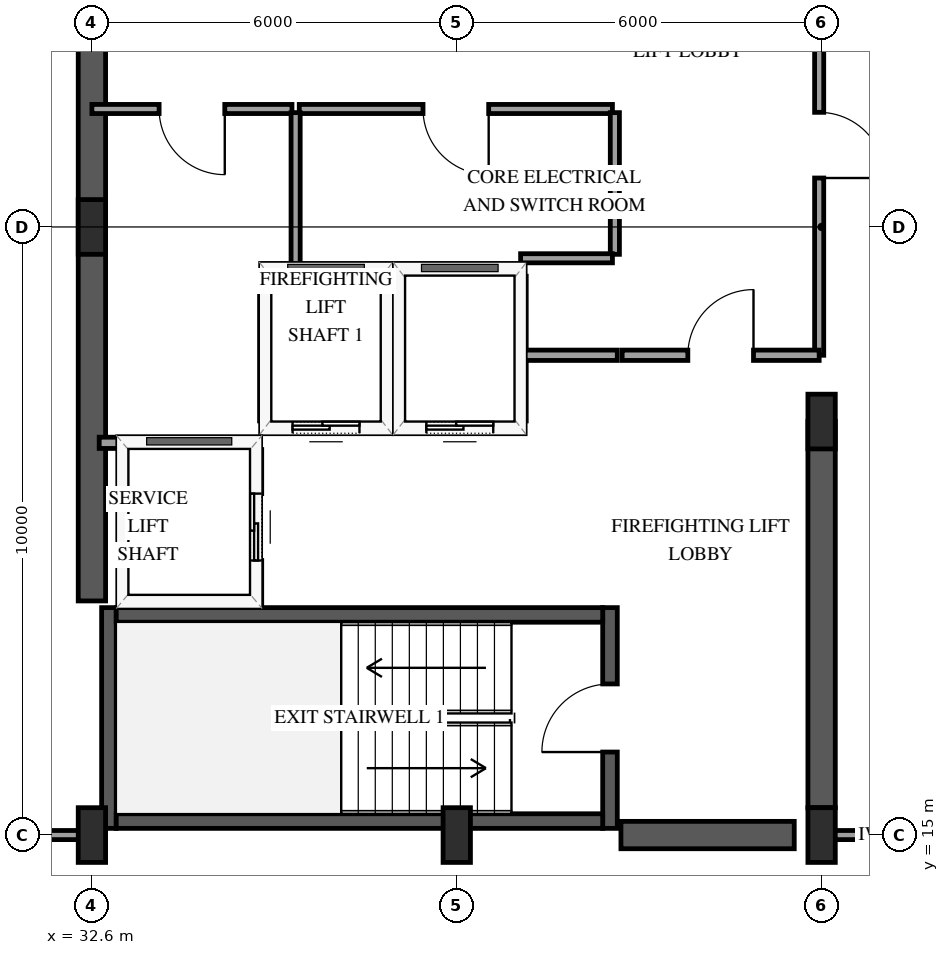
"""IFC4 building model, lengths in metres.
Left out: names, types, materials, properties, quantities, classifications, styles, units other than length and angle.
Written with IfcOpenShell. Run it as: python <this file> out.ifc"""

import sys

from ifc_helpers import new_model, si_unit, direction, frame, frame_2d, origin, origin_2d, place, context, subcontext, project, spatial, rectangle, extrude, element, fill, save


model = new_model("IFC4")
c1 = context("Model", 3, precision=1e-05, world=origin(), true_north=direction((0.0, 1.0)))
c2 = subcontext(c1, "Body", "Model", "MODEL_VIEW")
j1 = project(units=[si_unit("LENGTHUNIT", "METRE"), si_unit("PLANEANGLEUNIT", "RADIAN")], contexts=[c1])
p1 = place(None, origin())
s1 = spatial("IfcSite", under=j1, at=p1, CompositionType="ELEMENT")
p2 = place(p1, origin())
s2 = spatial("IfcBuilding", under=s1, at=p2, CompositionType="ELEMENT")
p3 = place(p2, frame((0.0, 0.0, 272.5)))
s3 = spatial("IfcBuildingStorey", under=s2, at=p3, CompositionType="ELEMENT", Elevation=272.5)
p4 = place(p3, frame((32.88, 15.11, 0.0), z_axis=(0.0, 0.0, 1.0), x_axis=(0.0, 1.0, 0.0)))
e1 = element("IfcWall", 1, at=p4, inside=s3, PredefinedType="SHEAR", context=c2, shape_type="SweptSolid", body=[
    extrude(rectangle(XDim=3.63, YDim=0.24, at=frame_2d((1.815, 0.0))), origin(), (0.0, 0.0, 1.0), 3.75),
])
p5 = place(p3, frame((41.12, 15.11, 0.0), z_axis=(0.0, 0.0, 1.0), x_axis=(0.0, 1.0, 0.0)))
e2 = element("IfcWall", 2, at=p5, inside=s3, PredefinedType="SHEAR", context=c2, shape_type="SweptSolid", body=[
    extrude(rectangle(XDim=3.63, YDim=0.24, at=frame_2d((1.815, 0.0))), origin(), (0.0, 0.0, 1.0), 3.75),
])
p6 = place(p5, frame((1.255, 0.0, 0.0)))
e3 = element("IfcOpeningElement", 3, at=p6, cuts=e2, PredefinedType="OPENING", context=c2, shape_type="SweptSolid", body=[
    extrude(rectangle(XDim=1.12, YDim=2.15, at=frame_2d((0.56, 1.075))), frame((0.0, 0.13, 0.0), z_axis=(0.0, -1.0, 0.0), x_axis=(1.0, 0.0, 0.0)), (0.0, 0.0, 1.0), 0.26),
])
for number, where, z_axis, x_axis in (
    (4, (33.0, 15.23, 0.0), (0.0, 0.0, 1.0), (1.0, 0.0, 0.0)),
    (5, (33.0, 18.62, 0.0), (0.0, 0.0, 1.0), (1.0, 0.0, 0.0)),
):
    element("IfcWall", number, at=place(p3, frame(where, z_axis=z_axis, x_axis=x_axis)), inside=s3, PredefinedType="SHEAR", context=c2, shape_type="SweptSolid", body=[
        extrude(rectangle(XDim=8.0, YDim=0.24, at=frame_2d((4.0, 0.0))), origin(), (0.0, 0.0, 1.0), 3.75),
    ])
p7 = place(p3, frame((32.6, 18.85, 0.0), z_axis=(0.0, 0.0, 1.0), x_axis=(0.0, 1.0, 0.0)))
e6 = element("IfcWall", 6, at=p7, inside=s3, PredefinedType="SHEAR", context=c2, shape_type="SweptSolid", body=[
    extrude(rectangle(XDim=12.3, YDim=0.45, at=frame_2d((6.15, 0.0))), origin(), (0.0, 0.0, 1.0), 3.75),
])
p8 = place(p3, frame((41.3, 15.0, 0.0), z_axis=(0.0, 0.0, 1.0), x_axis=(1.0, 0.0, 0.0)))
e7 = element("IfcWall", 7, at=p8, inside=s3, PredefinedType="SHEAR", context=c2, shape_type="SweptSolid", body=[
    extrude(rectangle(XDim=2.85, YDim=0.45, at=frame_2d((1.425, 0.0))), origin(), (0.0, 0.0, 1.0), 3.75),
])
p9 = place(p3, frame((44.6, 15.45, 0.0), z_axis=(0.0, 0.0, 1.0), x_axis=(0.0, 1.0, 0.0)))
e8 = element("IfcWall", 8, at=p9, inside=s3, PredefinedType="SHEAR", context=c2, shape_type="SweptSolid", body=[
    extrude(rectangle(XDim=6.35, YDim=0.45, at=frame_2d((3.175, 0.0))), origin(), (0.0, 0.0, 1.0), 3.75),
])
for number, where, z_axis, x_axis in (
    (9, (32.6, 15.0, 0.0), (0.0, 0.0, 1.0), (1.0, 0.0, 0.0)),
    (10, (32.6, 25.0, 0.0), (0.0, 0.0, 1.0), (1.0, 0.0, 0.0)),
    (11, (38.6, 15.0, 0.0), (0.0, 0.0, 1.0), (1.0, 0.0, 0.0)),
    (12, (44.6, 15.0, 0.0), (0.0, 0.0, 1.0), (1.0, 0.0, 0.0)),
    (13, (44.6, 21.8, 0.0), (0.0, 0.0, 1.0), (1.0, 0.0, 0.0)),
):
    element("IfcColumn", number, at=place(p3, frame(where, z_axis=z_axis, x_axis=x_axis)), inside=s3, PredefinedType="PILASTER", context=c2, shape_type="SweptSolid", body=[
        extrude(rectangle(XDim=0.45, YDim=0.9, at=origin_2d()), origin(), (0.0, 0.0, 1.0), 3.75),
    ])
p10 = place(p3, frame((35.45, 21.7, 0.0), z_axis=(0.0, 0.0, 1.0), x_axis=(1.0, 0.0, 0.0)))
e14 = element("IfcWall", 14, at=p10, inside=s3, PredefinedType="SOLIDWALL", context=c2, shape_type="SweptSolid", body=[
    extrude(rectangle(XDim=2.0, YDim=0.185, at=frame_2d((1.0, 0.0))), origin(), (0.0, 0.0, 1.0), 3.45),
])
p11 = place(p10, frame((0.45, 0.0, 0.0)))
e15 = element("IfcOpeningElement", 15, at=p11, cuts=e14, PredefinedType="OPENING", context=c2, shape_type="SweptSolid", body=[
    extrude(rectangle(XDim=1.1, YDim=2.15, at=frame_2d((0.55, 1.075))), frame((0.0, 0.103, 0.0), z_axis=(0.0, -1.0, 0.0), x_axis=(1.0, 0.0, 0.0)), (0.0, 0.0, 1.0), 0.205),
])
p12 = place(p3, frame((35.45, 24.3, 0.0), z_axis=(0.0, 0.0, 1.0), x_axis=(1.0, 0.0, 0.0)))
e16 = element("IfcWall", 16, at=p12, inside=s3, PredefinedType="SOLIDWALL", context=c2, shape_type="SweptSolid", body=[
    extrude(rectangle(XDim=2.0, YDim=0.185, at=frame_2d((1.0, 0.0))), origin(), (0.0, 0.0, 1.0), 3.45),
])
for number, where, z_axis, x_axis in (
    (17, (35.45, 21.81, 0.0), (0.0, 0.0, 1.0), (0.0, 1.0, 0.0)),
    (18, (37.45, 21.81, 0.0), (0.0, 0.0, 1.0), (0.0, 1.0, 0.0)),
):
    element("IfcWall", number, at=place(p3, frame(where, z_axis=z_axis, x_axis=x_axis)), inside=s3, PredefinedType="SOLIDWALL", context=c2, shape_type="SweptSolid", body=[
        extrude(rectangle(XDim=2.38, YDim=0.185, at=frame_2d((1.19, 0.0))), origin(), (0.0, 0.0, 1.0), 3.45),
    ])
p13 = place(p3, frame((37.65, 21.7, 0.0), z_axis=(0.0, 0.0, 1.0), x_axis=(1.0, 0.0, 0.0)))
e19 = element("IfcWall", 19, at=p13, inside=s3, PredefinedType="SOLIDWALL", context=c2, shape_type="SweptSolid", body=[
    extrude(rectangle(XDim=2.0, YDim=0.185, at=frame_2d((1.0, 0.0))), origin(), (0.0, 0.0, 1.0), 3.45),
])
p14 = place(p13, frame((0.45, 0.0, 0.0)))
e20 = element("IfcOpeningElement", 20, at=p14, cuts=e19, PredefinedType="OPENING", context=c2, shape_type="SweptSolid", body=[
    extrude(rectangle(XDim=1.1, YDim=2.15, at=frame_2d((0.55, 1.075))), frame((0.0, 0.103, 0.0), z_axis=(0.0, -1.0, 0.0), x_axis=(1.0, 0.0, 0.0)), (0.0, 0.0, 1.0), 0.205),
])
p15 = place(p3, frame((37.65, 24.3, 0.0), z_axis=(0.0, 0.0, 1.0), x_axis=(1.0, 0.0, 0.0)))
e21 = element("IfcWall", 21, at=p15, inside=s3, PredefinedType="SOLIDWALL", context=c2, shape_type="SweptSolid", body=[
    extrude(rectangle(XDim=2.0, YDim=0.185, at=frame_2d((1.0, 0.0))), origin(), (0.0, 0.0, 1.0), 3.45),
])
p16 = place(p3, frame((39.65, 21.81, 0.0), z_axis=(0.0, 0.0, 1.0), x_axis=(0.0, 1.0, 0.0)))
e22 = element("IfcWall", 22, at=p16, inside=s3, PredefinedType="SOLIDWALL", context=c2, shape_type="SweptSolid", body=[
    extrude(rectangle(XDim=2.38, YDim=0.185, at=frame_2d((1.19, 0.0))), origin(), (0.0, 0.0, 1.0), 3.45),
])
p17 = place(p3, frame((32.72, 21.45, 0.0), z_axis=(0.0, 0.0, 1.0), x_axis=(1.0, 0.0, 0.0)))
e23 = element("IfcWall", 23, at=p17, inside=s3, PredefinedType="SOLIDWALL", context=c2, shape_type="SweptSolid", body=[
    extrude(rectangle(XDim=2.58, YDim=0.185, at=frame_2d((1.29, 0.0))), origin(), (0.0, 0.0, 1.0), 3.45),
])
p18 = place(p3, frame((35.3, 18.79, 0.0), z_axis=(0.0, 0.0, 1.0), x_axis=(0.0, 1.0, 0.0)))
e24 = element("IfcWall", 24, at=p18, inside=s3, PredefinedType="SOLIDWALL", context=c2, shape_type="SweptSolid", body=[
    extrude(rectangle(XDim=2.55, YDim=0.185, at=frame_2d((1.275, 0.0))), origin(), (0.0, 0.0, 1.0), 3.45),
])
p19 = place(p18, frame((0.725, 0.0, 0.0)))
e25 = element("IfcOpeningElement", 25, at=p19, cuts=e24, PredefinedType="OPENING", context=c2, shape_type="SweptSolid", body=[
    extrude(rectangle(XDim=1.1, YDim=2.15, at=frame_2d((0.55, 1.075))), frame((0.0, 0.103, 0.0), z_axis=(0.0, -1.0, 0.0), x_axis=(1.0, 0.0, 0.0)), (0.0, 0.0, 1.0), 0.205),
])
p20 = place(p3, frame((44.56, 29.8, 0.0), z_axis=(0.0, 0.0, 1.0), x_axis=(0.0, -1.0, 0.0)))
e26 = element("IfcWall", 26, at=p20, inside=s3, PredefinedType="PARTITIONING", context=c2, shape_type="SweptSolid", body=[
    extrude(rectangle(XDim=6.91, YDim=0.15, at=frame_2d((3.455, 0.0))), origin(), (0.0, 0.0, 1.0), 2.49),
])
p21 = place(p20, frame((2.915, 0.0, 0.0)))
e27 = element("IfcOpeningElement", 27, at=p21, cuts=e26, PredefinedType="OPENING", context=c2, shape_type="SweptSolid", body=[
    extrude(rectangle(XDim=1.08, YDim=2.15, at=frame_2d((0.54, 1.075))), frame((0.0, 0.085, 0.0), z_axis=(0.0, -1.0, 0.0), x_axis=(1.0, 0.0, 0.0)), (0.0, 0.0, 1.0), 0.17),
])
p22 = place(p3, frame((41.16, 26.94, 0.0), z_axis=(0.0, 0.0, 1.0), x_axis=(-1.0, 0.0, 0.0)))
e28 = element("IfcWall", 28, at=p22, inside=s3, PredefinedType="PARTITIONING", context=c2, shape_type="SweptSolid", body=[
    extrude(rectangle(XDim=5.15, YDim=0.15, at=frame_2d((2.575, 0.0))), origin(), (0.0, 0.0, 1.0), 3.45),
])
p23 = place(p22, frame((2.035, 0.0, 0.0)))
e29 = element("IfcOpeningElement", 29, at=p23, cuts=e28, PredefinedType="OPENING", context=c2, shape_type="SweptSolid", body=[
    extrude(rectangle(XDim=1.08, YDim=2.15, at=frame_2d((0.54, 1.075))), frame((0.0, 0.085, 0.0), z_axis=(0.0, -1.0, 0.0), x_axis=(1.0, 0.0, 0.0)), (0.0, 0.0, 1.0), 0.17),
])
p24 = place(p3, frame((35.89, 26.94, 0.0), z_axis=(0.0, 0.0, 1.0), x_axis=(-1.0, 0.0, 0.0)))
e30 = element("IfcWall", 30, at=p24, inside=s3, PredefinedType="PARTITIONING", context=c2, shape_type="SweptSolid", body=[
    extrude(rectangle(XDim=3.29, YDim=0.15, at=frame_2d((1.645, 0.0))), origin(), (0.0, 0.0, 1.0), 3.45),
])
p25 = place(p24, frame((1.105, 0.0, 0.0)))
e31 = element("IfcOpeningElement", 31, at=p25, cuts=e30, PredefinedType="OPENING", context=c2, shape_type="SweptSolid", body=[
    extrude(rectangle(XDim=1.08, YDim=2.15, at=frame_2d((0.54, 1.075))), frame((0.0, 0.085, 0.0), z_axis=(0.0, -1.0, 0.0), x_axis=(1.0, 0.0, 0.0)), (0.0, 0.0, 1.0), 0.17),
])
p26 = place(p3, frame((41.32, 22.89, 0.0), z_axis=(0.0, 0.0, 1.0), x_axis=(1.0, 0.0, 0.0)))
e32 = element("IfcWall", 32, at=p26, inside=s3, PredefinedType="PARTITIONING", context=c2, shape_type="SweptSolid", body=[
    extrude(rectangle(XDim=3.24, YDim=0.17, at=frame_2d((1.62, 0.0))), origin(), (0.0, 0.0, 1.0), 3.45),
])
p27 = place(p26, frame((1.08, 0.0, 0.0)))
e33 = element("IfcOpeningElement", 33, at=p27, cuts=e32, PredefinedType="OPENING", context=c2, shape_type="SweptSolid", body=[
    extrude(rectangle(XDim=1.08, YDim=2.15, at=frame_2d((0.54, 1.075))), frame((0.0, 0.095, 0.0), z_axis=(0.0, -1.0, 0.0), x_axis=(1.0, 0.0, 0.0)), (0.0, 0.0, 1.0), 0.19),
])
p28 = place(p3, frame((32.53, 15.0, 0.0), z_axis=(0.0, 0.0, 1.0), x_axis=(-1.0, 0.0, 0.0)))
e34 = element("IfcWall", 34, at=p28, inside=s3, PredefinedType="PARTITIONING", context=c2, shape_type="SweptSolid", body=[
    extrude(rectangle(XDim=2.982, YDim=0.15, at=frame_2d((1.491, 0.0))), origin(), (0.0, 0.0, 1.0), 3.45),
])
p29 = place(p3, frame((35.95, 26.88, 0.0), z_axis=(0.0, 0.0, 1.0), x_axis=(0.0, -1.0, 0.0)))
e35 = element("IfcWall", 35, at=p29, inside=s3, PredefinedType="PARTITIONING", context=c2, shape_type="SweptSolid", body=[
    extrude(rectangle(XDim=2.58, YDim=0.15, at=frame_2d((1.29, 0.0))), origin(), (0.0, 0.0, 1.0), 3.45),
])
p30 = place(p3, frame((41.2, 24.55, 0.0), z_axis=(0.0, 0.0, 1.0), x_axis=(0.0, 1.0, 0.0)))
e36 = element("IfcWall", 36, at=p30, inside=s3, PredefinedType="PARTITIONING", context=c2, shape_type="SweptSolid", body=[
    extrude(rectangle(XDim=2.33, YDim=0.15, at=frame_2d((1.165, 0.0))), origin(), (0.0, 0.0, 1.0), 3.45),
])
p31 = place(p3, frame((46.58, 15.0, 0.0), z_axis=(0.0, 0.0, 1.0), x_axis=(-1.0, 0.0, 0.0)))
e37 = element("IfcWall", 37, at=p31, inside=s3, PredefinedType="PARTITIONING", context=c2, shape_type="SweptSolid", body=[
    extrude(rectangle(XDim=1.91, YDim=0.15, at=frame_2d((0.955, 0.0))), origin(), (0.0, 0.0, 1.0), 3.45),
])
p32 = place(p3, frame((39.72, 22.89, 0.0), z_axis=(0.0, 0.0, 1.0), x_axis=(1.0, 0.0, 0.0)))
e38 = element("IfcWall", 38, at=p32, inside=s3, PredefinedType="PARTITIONING", context=c2, shape_type="SweptSolid", body=[
    extrude(rectangle(XDim=1.52, YDim=0.17, at=frame_2d((0.76, 0.0))), origin(), (0.0, 0.0, 1.0), 3.45),
])
p33 = place(p3, frame((39.65, 24.485, 0.0), z_axis=(0.0, 0.0, 1.0), x_axis=(1.0, 0.0, 0.0)))
e39 = element("IfcWall", 39, at=p33, inside=s3, PredefinedType="PARTITIONING", context=c2, shape_type="SweptSolid", body=[
    extrude(rectangle(XDim=1.51, YDim=0.15, at=frame_2d((0.755, 0.0))), origin(), (0.0, 0.0, 1.0), 3.45),
])
p34 = place(p11, origin())
e40 = element("IfcDoor", 40, at=p34, inside=s3, OperationType="SLIDING_TO_LEFT", PredefinedType="DOOR", context=c2, shape_type="SweptSolid", body=[
    extrude(rectangle(XDim=1.1, YDim=2.15, at=frame_2d((0.55, 1.075))), frame((0.0, 0.025, 0.0), z_axis=(0.0, -1.0, 0.0), x_axis=(1.0, 0.0, 0.0)), (0.0, 0.0, 1.0), 0.05),
])
fill(e15, e40)
p35 = place(p14, origin())
e41 = element("IfcDoor", 41, at=p35, inside=s3, OperationType="SLIDING_TO_LEFT", PredefinedType="DOOR", context=c2, shape_type="SweptSolid", body=[
    extrude(rectangle(XDim=1.1, YDim=2.15, at=frame_2d((0.55, 1.075))), frame((0.0, 0.025, 0.0), z_axis=(0.0, -1.0, 0.0), x_axis=(1.0, 0.0, 0.0)), (0.0, 0.0, 1.0), 0.05),
])
fill(e20, e41)
p36 = place(p19, origin())
e42 = element("IfcDoor", 42, at=p36, inside=s3, OperationType="SLIDING_TO_LEFT", PredefinedType="DOOR", context=c2, shape_type="SweptSolid", body=[
    extrude(rectangle(XDim=1.1, YDim=2.15, at=frame_2d((0.55, 1.075))), frame((0.0, 0.025, 0.0), z_axis=(0.0, -1.0, 0.0), x_axis=(1.0, 0.0, 0.0)), (0.0, 0.0, 1.0), 0.05),
])
fill(e25, e42)
p37 = place(p6, origin())
e43 = element("IfcDoor", 43, at=p37, inside=s3, OperationType="SINGLE_SWING_LEFT", PredefinedType="DOOR", context=c2, shape_type="SweptSolid", body=[
    extrude(rectangle(XDim=1.12, YDim=2.15, at=frame_2d((0.56, 1.075))), frame((0.0, 0.025, 0.0), z_axis=(0.0, -1.0, 0.0), x_axis=(1.0, 0.0, 0.0)), (0.0, 0.0, 1.0), 0.05),
])
fill(e3, e43)
p38 = place(p21, origin())
e44 = element("IfcDoor", 44, at=p38, inside=s3, OperationType="SINGLE_SWING_RIGHT", PredefinedType="DOOR", context=c2, shape_type="SweptSolid", body=[
    extrude(rectangle(XDim=1.08, YDim=2.15, at=frame_2d((0.54, 1.075))), frame((0.0, 0.025, 0.0), z_axis=(0.0, -1.0, 0.0), x_axis=(1.0, 0.0, 0.0)), (0.0, 0.0, 1.0), 0.05),
])
fill(e27, e44)
p39 = place(p23, origin())
e45 = element("IfcDoor", 45, at=p39, inside=s3, OperationType="SINGLE_SWING_LEFT", PredefinedType="DOOR", context=c2, shape_type="SweptSolid", body=[
    extrude(rectangle(XDim=1.08, YDim=2.15, at=frame_2d((0.54, 1.075))), frame((0.0, 0.025, 0.0), z_axis=(0.0, -1.0, 0.0), x_axis=(1.0, 0.0, 0.0)), (0.0, 0.0, 1.0), 0.05),
])
fill(e29, e45)
p40 = place(p25, origin())
e46 = element("IfcDoor", 46, at=p40, inside=s3, OperationType="SINGLE_SWING_LEFT", PredefinedType="DOOR", context=c2, shape_type="SweptSolid", body=[
    extrude(rectangle(XDim=1.08, YDim=2.15, at=frame_2d((0.54, 1.075))), frame((0.0, 0.025, 0.0), z_axis=(0.0, -1.0, 0.0), x_axis=(1.0, 0.0, 0.0)), (0.0, 0.0, 1.0), 0.05),
])
fill(e31, e46)
p41 = place(p27, origin())
e47 = element("IfcDoor", 47, at=p41, inside=s3, OperationType="SINGLE_SWING_RIGHT", PredefinedType="DOOR", context=c2, shape_type="SweptSolid", body=[
    extrude(rectangle(XDim=1.08, YDim=2.15, at=frame_2d((0.54, 1.075))), frame((0.0, 0.025, 0.0), z_axis=(0.0, -1.0, 0.0), x_axis=(1.0, 0.0, 0.0)), (0.0, 0.0, 1.0), 0.05),
])
fill(e33, e47)
save(model, sys.argv[1])
